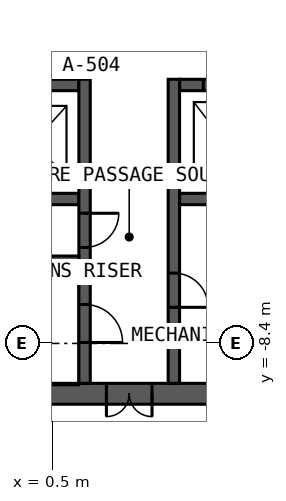
"""IFC4 building model, lengths in metres.
Left out: names, types, materials, properties, quantities, classifications, styles, units other than length and angle.
Written with IfcOpenShell. Run it as: python <this file> out.ifc"""

import sys

from ifc_helpers import new_model, si_unit, direction, frame, frame_2d, origin, place, context, subcontext, project, spatial, rectangle, extrude, element, fill, save


model = new_model("IFC4")
c1 = context("Model", 3, precision=1e-05, world=origin(), true_north=direction((0.0, 1.0)))
c2 = subcontext(c1, "Body", "Model", "MODEL_VIEW")
j1 = project(units=[si_unit("LENGTHUNIT", "METRE"), si_unit("PLANEANGLEUNIT", "RADIAN")], contexts=[c1])
p1 = place(None, origin())
s1 = spatial("IfcSite", under=j1, at=p1, CompositionType="ELEMENT")
p2 = place(p1, origin())
s2 = spatial("IfcBuilding", under=s1, at=p2, CompositionType="ELEMENT")
p3 = place(p2, frame((0.0, 0.0, 118.0)))
s3 = spatial("IfcBuildingStorey", under=s2, at=p3, CompositionType="ELEMENT", Elevation=118.0)
p4 = place(p3, frame((10.0, -9.725, 0.0), z_axis=(0.0, 0.0, 1.0), x_axis=(-1.0, 0.0, 0.0)))
e1 = element("IfcWall", 1, at=p4, inside=s3, PredefinedType="SOLIDWALL", context=c2, shape_type="SweptSolid", body=[
    extrude(rectangle(XDim=20.0, YDim=0.55, at=frame_2d((10.0, 0.0))), origin(), (0.0, 0.0, 1.0), 4.0),
])
p5 = place(p4, frame((6.875, 0.0, 0.0)))
e2 = element("IfcOpeningElement", 2, at=p5, cuts=e1, PredefinedType="OPENING", context=c2, shape_type="SweptSolid", body=[
    extrude(rectangle(XDim=1.2, YDim=2.2, at=frame_2d((0.6, 1.1))), frame((0.0, 0.285, 0.0), z_axis=(0.0, -1.0, 0.0), x_axis=(1.0, 0.0, 0.0)), (0.0, 0.0, 1.0), 0.57),
])
p6 = place(p3, frame((-6.2, -1.6, 0.0), z_axis=(0.0, 0.0, 1.0), x_axis=(1.0, 0.0, 0.0)))
e3 = element("IfcWall", 3, at=p6, inside=s3, PredefinedType="SOLIDWALL", context=c2, shape_type="SweptSolid", body=[
    extrude(rectangle(XDim=7.4, YDim=0.3, at=frame_2d((3.7, 0.0))), origin(), (0.0, 0.0, 1.0), 4.0),
])
p7 = place(p3, frame((3.85, -1.6, 0.0), z_axis=(0.0, 0.0, 1.0), x_axis=(1.0, 0.0, 0.0)))
e4 = element("IfcWall", 4, at=p7, inside=s3, PredefinedType="SOLIDWALL", context=c2, shape_type="SweptSolid", body=[
    extrude(rectangle(XDim=2.35, YDim=0.3, at=frame_2d((1.175, 0.0))), origin(), (0.0, 0.0, 1.0), 4.0),
])
p8 = place(p7, frame((0.625, 0.0, 0.0)))
e5 = element("IfcOpeningElement", 5, at=p8, cuts=e4, PredefinedType="OPENING", context=c2, shape_type="SweptSolid", body=[
    extrude(rectangle(XDim=1.1, YDim=2.2, at=frame_2d((0.55, 1.1))), frame((0.0, 0.16, 0.0), z_axis=(0.0, -1.0, 0.0), x_axis=(1.0, 0.0, 0.0)), (0.0, 0.0, 1.0), 0.32),
])
p9 = place(p3, frame((-6.2, -4.6, 0.0), z_axis=(0.0, 0.0, 1.0), x_axis=(1.0, 0.0, 0.0)))
e6 = element("IfcWall", 6, at=p9, inside=s3, PredefinedType="SOLIDWALL", context=c2, shape_type="SweptSolid", body=[
    extrude(rectangle(XDim=7.4, YDim=0.3, at=frame_2d((3.7, 0.0))), origin(), (0.0, 0.0, 1.0), 4.0),
])
p10 = place(p3, frame((3.85, -4.6, 0.0), z_axis=(0.0, 0.0, 1.0), x_axis=(1.0, 0.0, 0.0)))
e7 = element("IfcWall", 7, at=p10, inside=s3, PredefinedType="SOLIDWALL", context=c2, shape_type="SweptSolid", body=[
    extrude(rectangle(XDim=2.35, YDim=0.3, at=frame_2d((1.175, 0.0))), origin(), (0.0, 0.0, 1.0), 4.0),
])
p11 = place(p3, frame((1.35, -1.45, 0.0), z_axis=(0.0, 0.0, 1.0), x_axis=(0.0, -1.0, 0.0)))
e8 = element("IfcWall", 8, at=p11, inside=s3, PredefinedType="SOLIDWALL", context=c2, shape_type="SweptSolid", body=[
    extrude(rectangle(XDim=8.0, YDim=0.3, at=frame_2d((4.0, 0.0))), origin(), (0.0, 0.0, 1.0), 4.0),
])
p12 = place(p11, frame((5.925, 0.0, 0.0)))
e9 = element("IfcOpeningElement", 9, at=p12, cuts=e8, PredefinedType="OPENING", context=c2, shape_type="SweptSolid", body=[
    extrude(rectangle(XDim=1.0, YDim=2.2, at=frame_2d((0.5, 1.1))), frame((0.0, 0.16, 0.0), z_axis=(0.0, -1.0, 0.0), x_axis=(1.0, 0.0, 0.0)), (0.0, 0.0, 1.0), 0.32),
])
p13 = place(p11, frame((3.525, 0.0, 0.0)))
e10 = element("IfcOpeningElement", 10, at=p13, cuts=e8, PredefinedType="OPENING", context=c2, shape_type="SweptSolid", body=[
    extrude(rectangle(XDim=0.9, YDim=2.2, at=frame_2d((0.45, 1.1))), frame((0.0, 0.16, 0.0), z_axis=(0.0, -1.0, 0.0), x_axis=(1.0, 0.0, 0.0)), (0.0, 0.0, 1.0), 0.32),
])
p14 = place(p3, frame((3.7, -1.45, 0.0), z_axis=(0.0, 0.0, 1.0), x_axis=(0.0, -1.0, 0.0)))
e11 = element("IfcWall", 11, at=p14, inside=s3, PredefinedType="SOLIDWALL", context=c2, shape_type="SweptSolid", body=[
    extrude(rectangle(XDim=8.0, YDim=0.3, at=frame_2d((4.0, 0.0))), origin(), (0.0, 0.0, 1.0), 4.0),
])
p15 = place(p14, frame((5.1, 0.0, 0.0)))
e12 = element("IfcOpeningElement", 12, at=p15, cuts=e11, PredefinedType="OPENING", context=c2, shape_type="SweptSolid", body=[
    extrude(rectangle(XDim=0.9, YDim=2.2, at=frame_2d((0.45, 1.1))), frame((0.0, 0.16, 0.0), z_axis=(0.0, -1.0, 0.0), x_axis=(1.0, 0.0, 0.0)), (0.0, 0.0, 1.0), 0.32),
])
p16 = place(p3, frame((-6.2, -6.2, 0.0), z_axis=(0.0, 0.0, 1.0), x_axis=(1.0, 0.0, 0.0)))
e13 = element("IfcWall", 13, at=p16, inside=s3, PredefinedType="SOLIDWALL", context=c2, shape_type="SweptSolid", body=[
    extrude(rectangle(XDim=7.4, YDim=0.2, at=frame_2d((3.7, 0.0))), origin(), (0.0, 0.0, 1.0), 4.0),
])
p17 = place(p5, origin())
e14 = element("IfcDoor", 14, at=p17, inside=s3, OperationType="DOUBLE_DOOR_SINGLE_SWING", PredefinedType="DOOR", context=c2, shape_type="SweptSolid", body=[
    extrude(rectangle(XDim=1.2, YDim=2.2, at=frame_2d((0.6, 1.1))), frame((0.0, 0.025, 0.0), z_axis=(0.0, -1.0, 0.0), x_axis=(1.0, 0.0, 0.0)), (0.0, 0.0, 1.0), 0.05),
])
fill(e2, e14)
p18 = place(p12, origin())
e15 = element("IfcDoor", 15, at=p18, inside=s3, OperationType="SINGLE_SWING_RIGHT", PredefinedType="DOOR", context=c2, shape_type="SweptSolid", body=[
    extrude(rectangle(XDim=1.0, YDim=2.2, at=frame_2d((0.5, 1.1))), frame((0.0, 0.025, 0.0), z_axis=(0.0, -1.0, 0.0), x_axis=(1.0, 0.0, 0.0)), (0.0, 0.0, 1.0), 0.05),
])
fill(e9, e15)
p19 = place(p13, origin())
e16 = element("IfcDoor", 16, at=p19, inside=s3, OperationType="SINGLE_SWING_LEFT", PredefinedType="DOOR", context=c2, shape_type="SweptSolid", body=[
    extrude(rectangle(XDim=0.9, YDim=2.2, at=frame_2d((0.45, 1.1))), frame((0.0, 0.025, 0.0), z_axis=(0.0, -1.0, 0.0), x_axis=(1.0, 0.0, 0.0)), (0.0, 0.0, 1.0), 0.05),
])
fill(e10, e16)
p20 = place(p15, origin())
e17 = element("IfcDoor", 17, at=p20, inside=s3, OperationType="SINGLE_SWING_RIGHT", PredefinedType="DOOR", context=c2, shape_type="SweptSolid", body=[
    extrude(rectangle(XDim=0.9, YDim=2.2, at=frame_2d((0.45, 1.1))), frame((0.0, 0.025, 0.0), z_axis=(0.0, -1.0, 0.0), x_axis=(1.0, 0.0, 0.0)), (0.0, 0.0, 1.0), 0.05),
])
fill(e12, e17)
p21 = place(p8, origin())
e18 = element("IfcDoor", 18, at=p21, inside=s3, OperationType="SLIDING_TO_LEFT", PredefinedType="DOOR", context=c2, shape_type="SweptSolid", body=[
    extrude(rectangle(XDim=1.1, YDim=2.2, at=frame_2d((0.55, 1.1))), frame((0.0, 0.025, 0.0), z_axis=(0.0, -1.0, 0.0), x_axis=(1.0, 0.0, 0.0)), (0.0, 0.0, 1.0), 0.05),
])
fill(e5, e18)
save(model, sys.argv[1])
